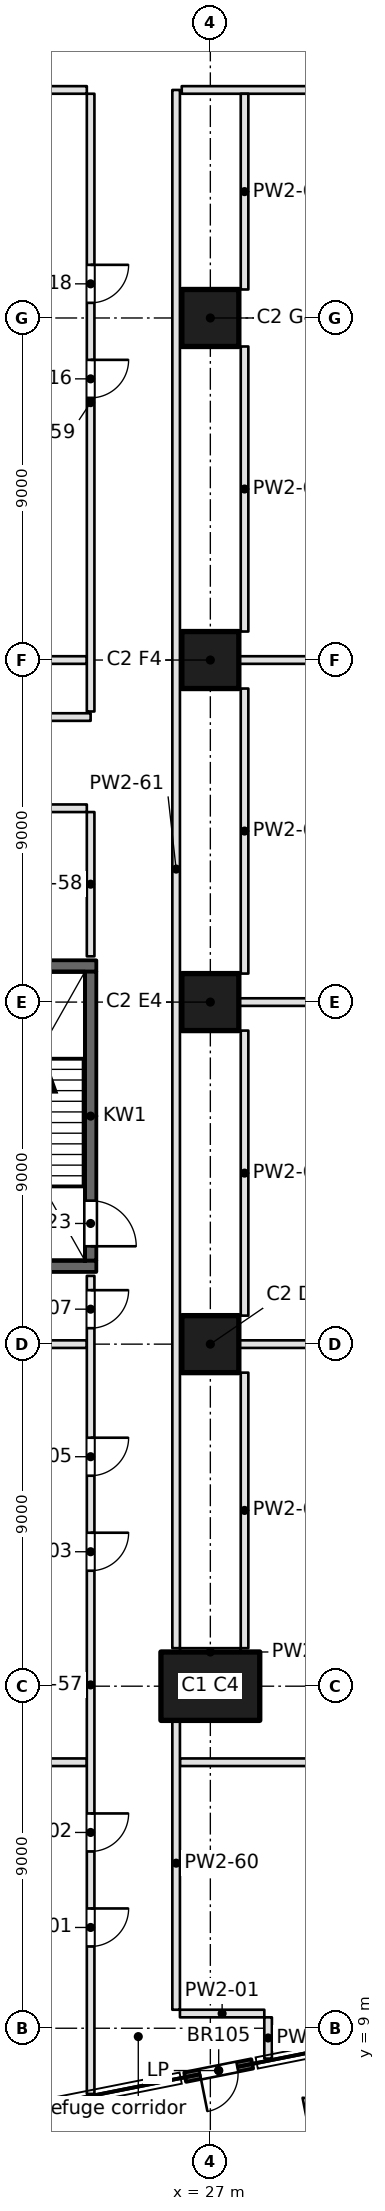
"""IFC4 building model, lengths in metres.
Left out: names, types, materials, properties, quantities, classifications, styles, units other than length and angle.
Written with IfcOpenShell. Run it as: python <this file> out.ifc"""

import sys

from ifc_helpers import new_model, si_unit, direction, frame, frame_2d, origin, origin_2d, place, context, subcontext, project, spatial, rectangle, extrude, element, fill, save


model = new_model("IFC4")
c1 = context("Model", 3, precision=1e-05, world=origin(), true_north=direction((0.0, 1.0)))
c2 = subcontext(c1, "Body", "Model", "MODEL_VIEW")
j1 = project(units=[si_unit("LENGTHUNIT", "METRE"), si_unit("PLANEANGLEUNIT", "RADIAN")], contexts=[c1])
p1 = place(None, origin())
s1 = spatial("IfcSite", under=j1, at=p1, CompositionType="ELEMENT")
p2 = place(p1, origin())
s2 = spatial("IfcBuilding", under=s1, at=p2, CompositionType="ELEMENT")
p3 = place(p2, frame((0.0, 0.0, 31.2)))
s3 = spatial("IfcBuildingStorey", under=s2, at=p3, CompositionType="ELEMENT", Elevation=31.2)
p4 = place(p3, frame((27.0, 18.0, 0.0), z_axis=(0.0, 0.0, 1.0), x_axis=(1.0, 0.0, 0.0)))
e1 = element("IfcColumn", 1, at=p4, inside=s3, PredefinedType="COLUMN", context=c2, shape_type="SweptSolid", body=[
    extrude(rectangle(XDim=2.6, YDim=1.8, at=origin_2d()), origin(), (0.0, 0.0, 1.0), 4.6),
])
for number, where, z_axis, x_axis in (
    (2, (27.0, 27.0, 0.0), (0.0, 0.0, 1.0), (1.0, 0.0, 0.0)),
    (3, (27.0, 36.0, 0.0), (0.0, 0.0, 1.0), (1.0, 0.0, 0.0)),
    (4, (27.0, 45.0, 0.0), (0.0, 0.0, 1.0), (1.0, 0.0, 0.0)),
    (5, (27.0, 54.0, 0.0), (0.0, 0.0, 1.0), (1.0, 0.0, 0.0)),
):
    element("IfcColumn", number, at=place(p3, frame(where, z_axis=z_axis, x_axis=x_axis)), inside=s3, PredefinedType="COLUMN", context=c2, shape_type="SweptSolid", body=[
        extrude(rectangle(XDim=1.5, YDim=1.5, at=origin_2d()), origin(), (0.0, 0.0, 1.0), 4.6),
    ])
p5 = place(p3, frame((26.337, 7.711, 0.0), z_axis=(0.0, 0.0, 1.0), x_axis=(0.98077319256, 0.195151081871, 0.0)))
e6 = element("IfcWall", 6, at=p5, inside=s3, PredefinedType="SOLIDWALL", context=c2, shape_type="SweptSolid", body=[
    extrude(rectangle(XDim=1.8, YDim=0.25, at=frame_2d((0.9, 0.0))), origin(), (0.0, 0.0, 1.0), 4.2),
])
p6 = place(p5, frame((0.4, 0.0, 0.0)))
e7 = element("IfcOpeningElement", 7, at=p6, cuts=e6, PredefinedType="OPENING", context=c2, shape_type="SweptSolid", body=[
    extrude(rectangle(XDim=1.0, YDim=2.1, at=frame_2d((0.5, 1.05))), frame((0.0, 0.125, 0.0), z_axis=(0.0, -1.0, 0.0), x_axis=(1.0, 0.0, 0.0)), (0.0, 0.0, 1.0), 0.25),
])
for number, where, z_axis, x_axis in (
    (8, (19.1, 29.05, -0.45), (0.0, 0.0, 1.0), (1.0, 0.0, 0.0)),
    (9, (19.1, 36.95, -0.45), (0.0, 0.0, 1.0), (1.0, 0.0, 0.0)),
):
    element("IfcWall", number, at=place(p3, frame(where, z_axis=z_axis, x_axis=x_axis)), inside=s3, PredefinedType="SOLIDWALL", context=c2, shape_type="SweptSolid", body=[
        extrude(rectangle(XDim=4.9, YDim=0.3, at=frame_2d((2.45, 0.0))), origin(), (0.0, 0.0, 1.0), 4.65),
    ])
p7 = place(p3, frame((23.85, 29.2, -0.45), z_axis=(0.0, 0.0, 1.0), x_axis=(0.0, 1.0, 0.0)))
e10 = element("IfcWall", 10, at=p7, inside=s3, PredefinedType="SOLIDWALL", context=c2, shape_type="SweptSolid", body=[
    extrude(rectangle(XDim=7.6, YDim=0.3, at=frame_2d((3.8, 0.0))), origin(), (0.0, 0.0, 1.0), 4.65),
])
p8 = place(p7, frame((0.375, 0.0, 0.45)))
e11 = element("IfcOpeningElement", 11, at=p8, cuts=e10, PredefinedType="OPENING", context=c2, shape_type="SweptSolid", body=[
    extrude(rectangle(XDim=1.2, YDim=2.1, at=frame_2d((0.6, 1.05))), frame((0.0, 0.15, 0.0), z_axis=(0.0, -1.0, 0.0), x_axis=(1.0, 0.0, 0.0)), (0.0, 0.0, 1.0), 0.3),
])
p9 = place(p3, frame((26.2, 9.387, 0.0), z_axis=(0.0, 0.0, 1.0), x_axis=(1.0, 0.0, 0.0)))
e12 = element("IfcWall", 12, at=p9, inside=s3, PredefinedType="PARTITIONING", context=c2, shape_type="SweptSolid", body=[
    extrude(rectangle(XDim=2.22, YDim=0.2, at=frame_2d((1.11, 0.0))), origin(), (0.0, 0.0, 1.0), 4.2),
])
p10 = place(p3, frame((9.162, 15.999, 0.0), z_axis=(0.0, 0.0, 1.0), x_axis=(1.0, 0.0, 0.0)))
e13 = element("IfcWall", 13, at=p10, inside=s3, PredefinedType="PARTITIONING", context=c2, shape_type="SweptSolid", body=[
    extrude(rectangle(XDim=14.588, YDim=0.2, at=frame_2d((7.294, 0.0))), origin(), (0.0, 0.0, 1.0), 4.2),
])
p11 = place(p3, frame((26.2, 15.999, 0.0), z_axis=(0.0, 0.0, 1.0), x_axis=(1.0, 0.0, 0.0)))
e14 = element("IfcWall", 14, at=p11, inside=s3, PredefinedType="PARTITIONING", context=c2, shape_type="SweptSolid", body=[
    extrude(rectangle(XDim=10.638, YDim=0.2, at=frame_2d((5.319, 0.0))), origin(), (0.0, 0.0, 1.0), 4.2),
])
p12 = place(p3, frame((26.2, 18.9, 0.0), z_axis=(0.0, 0.0, 1.0), x_axis=(1.0, 0.0, 0.0)))
e15 = element("IfcWall", 15, at=p12, inside=s3, PredefinedType="PARTITIONING", context=c2, shape_type="SweptSolid", body=[
    extrude(rectangle(XDim=1.6, YDim=0.2, at=frame_2d((0.8, 0.0))), origin(), (0.0, 0.0, 1.0), 4.2),
])
p13 = place(p3, frame((18.7, 27.0, 0.0), z_axis=(0.0, 0.0, 1.0), x_axis=(1.0, 0.0, 0.0)))
e16 = element("IfcWall", 16, at=p13, inside=s3, PredefinedType="PARTITIONING", context=c2, shape_type="SweptSolid", body=[
    extrude(rectangle(XDim=5.05, YDim=0.2, at=frame_2d((2.525, 0.0))), origin(), (0.0, 0.0, 1.0), 4.2),
])
for number, where, z_axis, x_axis in (
    (17, (27.7, 27.0, 0.0), (0.0, 0.0, 1.0), (1.0, 0.0, 0.0)),
    (18, (27.7, 36.0, 0.0), (0.0, 0.0, 1.0), (1.0, 0.0, 0.0)),
):
    element("IfcWall", number, at=place(p3, frame(where, z_axis=z_axis, x_axis=x_axis)), inside=s3, PredefinedType="PARTITIONING", context=c2, shape_type="SweptSolid", body=[
        extrude(rectangle(XDim=7.6, YDim=0.2, at=frame_2d((3.8, 0.0))), origin(), (0.0, 0.0, 1.0), 4.2),
    ])
p14 = place(p3, frame((23.75, 41.1, 0.0), z_axis=(0.0, 0.0, 1.0), x_axis=(-1.0, 0.0, 0.0)))
e19 = element("IfcWall", 19, at=p14, inside=s3, PredefinedType="PARTITIONING", context=c2, shape_type="SweptSolid", body=[
    extrude(rectangle(XDim=14.65, YDim=0.2, at=frame_2d((7.325, 0.0))), origin(), (0.0, 0.0, 1.0), 4.2),
])
p15 = place(p14, frame((6.825, 0.0, 0.0)))
e20 = element("IfcOpeningElement", 20, at=p15, cuts=e19, PredefinedType="OPENING", context=c2, shape_type="SweptSolid", body=[
    extrude(rectangle(XDim=1.0, YDim=2.1, at=frame_2d((0.5, 1.05))), frame((0.0, 0.1, 0.0), z_axis=(0.0, -1.0, 0.0), x_axis=(1.0, 0.0, 0.0)), (0.0, 0.0, 1.0), 0.2),
])
p16 = place(p14, frame((4.325, 0.0, 0.0)))
e21 = element("IfcOpeningElement", 21, at=p16, cuts=e19, PredefinedType="OPENING", context=c2, shape_type="SweptSolid", body=[
    extrude(rectangle(XDim=1.0, YDim=2.1, at=frame_2d((0.5, 1.05))), frame((0.0, 0.1, 0.0), z_axis=(0.0, -1.0, 0.0), x_axis=(1.0, 0.0, 0.0)), (0.0, 0.0, 1.0), 0.2),
])
p17 = place(p3, frame((6.1, 43.5, 0.0), z_axis=(0.0, 0.0, 1.0), x_axis=(1.0, 0.0, 0.0)))
e22 = element("IfcWall", 22, at=p17, inside=s3, PredefinedType="PARTITIONING", context=c2, shape_type="SweptSolid", body=[
    extrude(rectangle(XDim=17.75, YDim=0.2, at=frame_2d((8.875, 0.0))), origin(), (0.0, 0.0, 1.0), 4.2),
])
p18 = place(p17, frame((5.875, 0.0, 0.0)))
e23 = element("IfcOpeningElement", 23, at=p18, cuts=e22, PredefinedType="OPENING", context=c2, shape_type="SweptSolid", body=[
    extrude(rectangle(XDim=1.0, YDim=2.1, at=frame_2d((0.5, 1.05))), frame((0.0, 0.1, 0.0), z_axis=(0.0, -1.0, 0.0), x_axis=(1.0, 0.0, 0.0)), (0.0, 0.0, 1.0), 0.2),
])
p19 = place(p17, frame((8.375, 0.0, 0.0)))
e24 = element("IfcOpeningElement", 24, at=p19, cuts=e22, PredefinedType="OPENING", context=c2, shape_type="SweptSolid", body=[
    extrude(rectangle(XDim=1.0, YDim=2.1, at=frame_2d((0.5, 1.05))), frame((0.0, 0.1, 0.0), z_axis=(0.0, -1.0, 0.0), x_axis=(1.0, 0.0, 0.0)), (0.0, 0.0, 1.0), 0.2),
])
p20 = place(p3, frame((18.7, 45.0, 0.0), z_axis=(0.0, 0.0, 1.0), x_axis=(1.0, 0.0, 0.0)))
e25 = element("IfcWall", 25, at=p20, inside=s3, PredefinedType="PARTITIONING", context=c2, shape_type="SweptSolid", body=[
    extrude(rectangle(XDim=5.05, YDim=0.2, at=frame_2d((2.525, 0.0))), origin(), (0.0, 0.0, 1.0), 4.2),
])
p21 = place(p3, frame((27.7, 45.0, 0.0), z_axis=(0.0, 0.0, 1.0), x_axis=(1.0, 0.0, 0.0)))
e26 = element("IfcWall", 26, at=p21, inside=s3, PredefinedType="PARTITIONING", context=c2, shape_type="SweptSolid", body=[
    extrude(rectangle(XDim=7.6, YDim=0.2, at=frame_2d((3.8, 0.0))), origin(), (0.0, 0.0, 1.0), 4.2),
])
p22 = place(p3, frame((23.75, 60.0, 0.0), z_axis=(0.0, 0.0, 1.0), x_axis=(-1.0, 0.0, 0.0)))
e27 = element("IfcWall", 27, at=p22, inside=s3, PredefinedType="PARTITIONING", context=c2, shape_type="SweptSolid", body=[
    extrude(rectangle(XDim=14.846, YDim=0.2, at=frame_2d((7.423, 0.0))), origin(), (0.0, 0.0, 1.0), 4.2),
])
p23 = place(p3, frame((40.1, 60.0, 0.0), z_axis=(0.0, 0.0, 1.0), x_axis=(-1.0, 0.0, 0.0)))
e28 = element("IfcWall", 28, at=p23, inside=s3, PredefinedType="PARTITIONING", context=c2, shape_type="SweptSolid", body=[
    extrude(rectangle(XDim=13.853, YDim=0.2, at=frame_2d((6.926, 0.0))), origin(), (0.0, 0.0, 1.0), 4.2),
])
p24 = place(p3, frame((23.85, 7.272, 0.0), z_axis=(0.0, 0.0, 1.0), x_axis=(0.0, 1.0, 0.0)))
e29 = element("IfcWall", 29, at=p24, inside=s3, PredefinedType="PARTITIONING", context=c2, shape_type="SweptSolid", body=[
    extrude(rectangle(XDim=21.524, YDim=0.2, at=frame_2d((10.762, 0.0))), origin(), (0.0, 0.0, 1.0), 4.2),
])
p25 = place(p24, frame((3.88, 0.0, 0.0)))
e30 = element("IfcOpeningElement", 30, at=p25, cuts=e29, PredefinedType="OPENING", context=c2, shape_type="SweptSolid", body=[
    extrude(rectangle(XDim=1.0, YDim=2.1, at=frame_2d((0.5, 1.05))), frame((0.0, 0.1, 0.0), z_axis=(0.0, -1.0, 0.0), x_axis=(1.0, 0.0, 0.0)), (0.0, 0.0, 1.0), 0.2),
])
p26 = place(p24, frame((6.38, 0.0, 0.0)))
e31 = element("IfcOpeningElement", 31, at=p26, cuts=e29, PredefinedType="OPENING", context=c2, shape_type="SweptSolid", body=[
    extrude(rectangle(XDim=1.0, YDim=2.1, at=frame_2d((0.5, 1.05))), frame((0.0, 0.1, 0.0), z_axis=(0.0, -1.0, 0.0), x_axis=(1.0, 0.0, 0.0)), (0.0, 0.0, 1.0), 0.2),
])
p27 = place(p24, frame((13.766, 0.0, 0.0)))
e32 = element("IfcOpeningElement", 32, at=p27, cuts=e29, PredefinedType="OPENING", context=c2, shape_type="SweptSolid", body=[
    extrude(rectangle(XDim=1.0, YDim=2.1, at=frame_2d((0.5, 1.05))), frame((0.0, 0.1, 0.0), z_axis=(0.0, -1.0, 0.0), x_axis=(1.0, 0.0, 0.0)), (0.0, 0.0, 1.0), 0.2),
])
p28 = place(p24, frame((16.266, 0.0, 0.0)))
e33 = element("IfcOpeningElement", 33, at=p28, cuts=e29, PredefinedType="OPENING", context=c2, shape_type="SweptSolid", body=[
    extrude(rectangle(XDim=1.0, YDim=2.1, at=frame_2d((0.5, 1.05))), frame((0.0, 0.1, 0.0), z_axis=(0.0, -1.0, 0.0), x_axis=(1.0, 0.0, 0.0)), (0.0, 0.0, 1.0), 0.2),
])
p29 = place(p24, frame((20.148, 0.0, 0.0)))
e34 = element("IfcOpeningElement", 34, at=p29, cuts=e29, PredefinedType="OPENING", context=c2, shape_type="SweptSolid", body=[
    extrude(rectangle(XDim=1.0, YDim=2.1, at=frame_2d((0.5, 1.05))), frame((0.0, 0.1, 0.0), z_axis=(0.0, -1.0, 0.0), x_axis=(1.0, 0.0, 0.0)), (0.0, 0.0, 1.0), 0.2),
])
p30 = place(p3, frame((23.85, 37.204, 0.0), z_axis=(0.0, 0.0, 1.0), x_axis=(0.0, 1.0, 0.0)))
e35 = element("IfcWall", 35, at=p30, inside=s3, PredefinedType="PARTITIONING", context=c2, shape_type="SweptSolid", body=[
    extrude(rectangle(XDim=3.796, YDim=0.2, at=frame_2d((1.898, 0.0))), origin(), (0.0, 0.0, 1.0), 4.2),
])
p31 = place(p3, frame((23.85, 43.646, 0.0), z_axis=(0.0, 0.0, 1.0), x_axis=(0.0, 1.0, 0.0)))
e36 = element("IfcWall", 36, at=p31, inside=s3, PredefinedType="PARTITIONING", context=c2, shape_type="SweptSolid", body=[
    extrude(rectangle(XDim=16.254, YDim=0.2, at=frame_2d((8.127, 0.0))), origin(), (0.0, 0.0, 1.0), 4.2),
])
p32 = place(p31, frame((8.252, 0.0, 0.0)))
e37 = element("IfcOpeningElement", 37, at=p32, cuts=e36, PredefinedType="OPENING", context=c2, shape_type="SweptSolid", body=[
    extrude(rectangle(XDim=1.0, YDim=2.1, at=frame_2d((0.5, 1.05))), frame((0.0, 0.1, 0.0), z_axis=(0.0, -1.0, 0.0), x_axis=(1.0, 0.0, 0.0)), (0.0, 0.0, 1.0), 0.2),
])
p33 = place(p31, frame((10.752, 0.0, 0.0)))
e38 = element("IfcOpeningElement", 38, at=p33, cuts=e36, PredefinedType="OPENING", context=c2, shape_type="SweptSolid", body=[
    extrude(rectangle(XDim=1.0, YDim=2.1, at=frame_2d((0.5, 1.05))), frame((0.0, 0.1, 0.0), z_axis=(0.0, -1.0, 0.0), x_axis=(1.0, 0.0, 0.0)), (0.0, 0.0, 1.0), 0.2),
])
p34 = place(p3, frame((26.1, 17.2, 0.0), z_axis=(0.0, 0.0, 1.0), x_axis=(0.0, -1.0, 0.0)))
e39 = element("IfcWall", 39, at=p34, inside=s3, PredefinedType="PARTITIONING", context=c2, shape_type="SweptSolid", body=[
    extrude(rectangle(XDim=7.713, YDim=0.2, at=frame_2d((3.856, 0.0))), origin(), (0.0, 0.0, 1.0), 4.2),
])
p35 = place(p3, frame((26.1, 60.0, 0.0), z_axis=(0.0, 0.0, 1.0), x_axis=(0.0, -1.0, 0.0)))
e40 = element("IfcWall", 40, at=p35, inside=s3, PredefinedType="PARTITIONING", context=c2, shape_type="SweptSolid", body=[
    extrude(rectangle(XDim=41.0, YDim=0.2, at=frame_2d((20.5, 0.0))), origin(), (0.0, 0.0, 1.0), 4.2),
])
p36 = place(p3, frame((27.9, 26.25, 0.0), z_axis=(0.0, 0.0, 1.0), x_axis=(0.0, -1.0, 0.0)))
e41 = element("IfcWall", 41, at=p36, inside=s3, PredefinedType="PARTITIONING", context=c2, shape_type="SweptSolid", body=[
    extrude(rectangle(XDim=7.25, YDim=0.2, at=frame_2d((3.625, 0.0))), origin(), (0.0, 0.0, 1.0), 4.2),
])
for number, where, z_axis, x_axis in (
    (42, (27.9, 35.25, 0.0), (0.0, 0.0, 1.0), (0.0, -1.0, 0.0)),
    (43, (27.9, 44.25, 0.0), (0.0, 0.0, 1.0), (0.0, -1.0, 0.0)),
    (44, (27.9, 53.25, 0.0), (0.0, 0.0, 1.0), (0.0, -1.0, 0.0)),
):
    element("IfcWall", number, at=place(p3, frame(where, z_axis=z_axis, x_axis=x_axis)), inside=s3, PredefinedType="PARTITIONING", context=c2, shape_type="SweptSolid", body=[
        extrude(rectangle(XDim=7.5, YDim=0.2, at=frame_2d((3.75, 0.0))), origin(), (0.0, 0.0, 1.0), 4.2),
    ])
p37 = place(p3, frame((27.9, 59.9, 0.0), z_axis=(0.0, 0.0, 1.0), x_axis=(0.0, -1.0, 0.0)))
e45 = element("IfcWall", 45, at=p37, inside=s3, PredefinedType="PARTITIONING", context=c2, shape_type="SweptSolid", body=[
    extrude(rectangle(XDim=5.15, YDim=0.2, at=frame_2d((2.575, 0.0))), origin(), (0.0, 0.0, 1.0), 4.2),
])
p38 = place(p3, frame((28.52, 9.287, 0.0), z_axis=(0.0, 0.0, 1.0), x_axis=(0.0, -1.0, 0.0)))
e46 = element("IfcWall", 46, at=p38, inside=s3, PredefinedType="PARTITIONING", context=c2, shape_type="SweptSolid", body=[
    extrude(rectangle(XDim=1.087, YDim=0.2, at=frame_2d((0.543, 0.0))), origin(), (0.0, 0.0, 1.0), 4.2),
])
p39 = place(p6, frame((1.0, 0.0, 0.0), z_axis=(0.0, 0.0, 1.0), x_axis=(-1.0, 0.0, 0.0)))
e47 = element("IfcDoor", 47, at=p39, inside=s3, OperationType="SINGLE_SWING_RIGHT", PredefinedType="DOOR", context=c2, shape_type="SweptSolid", body=[
    extrude(rectangle(XDim=1.0, YDim=2.1, at=frame_2d((0.5, 1.05))), frame((0.0, 0.025, 0.0), z_axis=(0.0, -1.0, 0.0), x_axis=(1.0, 0.0, 0.0)), (0.0, 0.0, 1.0), 0.05),
])
fill(e7, e47)
p40 = place(p8, frame((1.2, 0.0, 0.0), z_axis=(0.0, 0.0, 1.0), x_axis=(-1.0, 0.0, 0.0)))
e48 = element("IfcDoor", 48, at=p40, inside=s3, OperationType="SINGLE_SWING_RIGHT", PredefinedType="DOOR", context=c2, shape_type="SweptSolid", body=[
    extrude(rectangle(XDim=1.2, YDim=2.1, at=frame_2d((0.6, 1.05))), frame((0.0, 0.025, 0.0), z_axis=(0.0, -1.0, 0.0), x_axis=(1.0, 0.0, 0.0)), (0.0, 0.0, 1.0), 0.05),
])
fill(e11, e48)
p41 = place(p25, frame((1.0, 0.0, 0.0), z_axis=(0.0, 0.0, 1.0), x_axis=(-1.0, 0.0, 0.0)))
e49 = element("IfcDoor", 49, at=p41, inside=s3, OperationType="SINGLE_SWING_LEFT", PredefinedType="DOOR", context=c2, shape_type="SweptSolid", body=[
    extrude(rectangle(XDim=1.0, YDim=2.1, at=frame_2d((0.5, 1.05))), frame((0.0, 0.025, 0.0), z_axis=(0.0, -1.0, 0.0), x_axis=(1.0, 0.0, 0.0)), (0.0, 0.0, 1.0), 0.05),
])
fill(e30, e49)
p42 = place(p26, frame((1.0, 0.0, 0.0), z_axis=(0.0, 0.0, 1.0), x_axis=(-1.0, 0.0, 0.0)))
e50 = element("IfcDoor", 50, at=p42, inside=s3, OperationType="SINGLE_SWING_LEFT", PredefinedType="DOOR", context=c2, shape_type="SweptSolid", body=[
    extrude(rectangle(XDim=1.0, YDim=2.1, at=frame_2d((0.5, 1.05))), frame((0.0, 0.025, 0.0), z_axis=(0.0, -1.0, 0.0), x_axis=(1.0, 0.0, 0.0)), (0.0, 0.0, 1.0), 0.05),
])
fill(e31, e50)
p43 = place(p27, frame((1.0, 0.0, 0.0), z_axis=(0.0, 0.0, 1.0), x_axis=(-1.0, 0.0, 0.0)))
e51 = element("IfcDoor", 51, at=p43, inside=s3, OperationType="SINGLE_SWING_LEFT", PredefinedType="DOOR", context=c2, shape_type="SweptSolid", body=[
    extrude(rectangle(XDim=1.0, YDim=2.1, at=frame_2d((0.5, 1.05))), frame((0.0, 0.025, 0.0), z_axis=(0.0, -1.0, 0.0), x_axis=(1.0, 0.0, 0.0)), (0.0, 0.0, 1.0), 0.05),
])
fill(e32, e51)
p44 = place(p28, frame((1.0, 0.0, 0.0), z_axis=(0.0, 0.0, 1.0), x_axis=(-1.0, 0.0, 0.0)))
e52 = element("IfcDoor", 52, at=p44, inside=s3, OperationType="SINGLE_SWING_LEFT", PredefinedType="DOOR", context=c2, shape_type="SweptSolid", body=[
    extrude(rectangle(XDim=1.0, YDim=2.1, at=frame_2d((0.5, 1.05))), frame((0.0, 0.025, 0.0), z_axis=(0.0, -1.0, 0.0), x_axis=(1.0, 0.0, 0.0)), (0.0, 0.0, 1.0), 0.05),
])
fill(e33, e52)
p45 = place(p29, frame((1.0, 0.0, 0.0), z_axis=(0.0, 0.0, 1.0), x_axis=(-1.0, 0.0, 0.0)))
e53 = element("IfcDoor", 53, at=p45, inside=s3, OperationType="SINGLE_SWING_LEFT", PredefinedType="DOOR", context=c2, shape_type="SweptSolid", body=[
    extrude(rectangle(XDim=1.0, YDim=2.1, at=frame_2d((0.5, 1.05))), frame((0.0, 0.025, 0.0), z_axis=(0.0, -1.0, 0.0), x_axis=(1.0, 0.0, 0.0)), (0.0, 0.0, 1.0), 0.05),
])
fill(e34, e53)
p46 = place(p32, frame((1.0, 0.0, 0.0), z_axis=(0.0, 0.0, 1.0), x_axis=(-1.0, 0.0, 0.0)))
e54 = element("IfcDoor", 54, at=p46, inside=s3, OperationType="SINGLE_SWING_LEFT", PredefinedType="DOOR", context=c2, shape_type="SweptSolid", body=[
    extrude(rectangle(XDim=1.0, YDim=2.1, at=frame_2d((0.5, 1.05))), frame((0.0, 0.025, 0.0), z_axis=(0.0, -1.0, 0.0), x_axis=(1.0, 0.0, 0.0)), (0.0, 0.0, 1.0), 0.05),
])
fill(e37, e54)
p47 = place(p33, frame((1.0, 0.0, 0.0), z_axis=(0.0, 0.0, 1.0), x_axis=(-1.0, 0.0, 0.0)))
e55 = element("IfcDoor", 55, at=p47, inside=s3, OperationType="SINGLE_SWING_LEFT", PredefinedType="DOOR", context=c2, shape_type="SweptSolid", body=[
    extrude(rectangle(XDim=1.0, YDim=2.1, at=frame_2d((0.5, 1.05))), frame((0.0, 0.025, 0.0), z_axis=(0.0, -1.0, 0.0), x_axis=(1.0, 0.0, 0.0)), (0.0, 0.0, 1.0), 0.05),
])
fill(e38, e55)
save(model, sys.argv[1])
